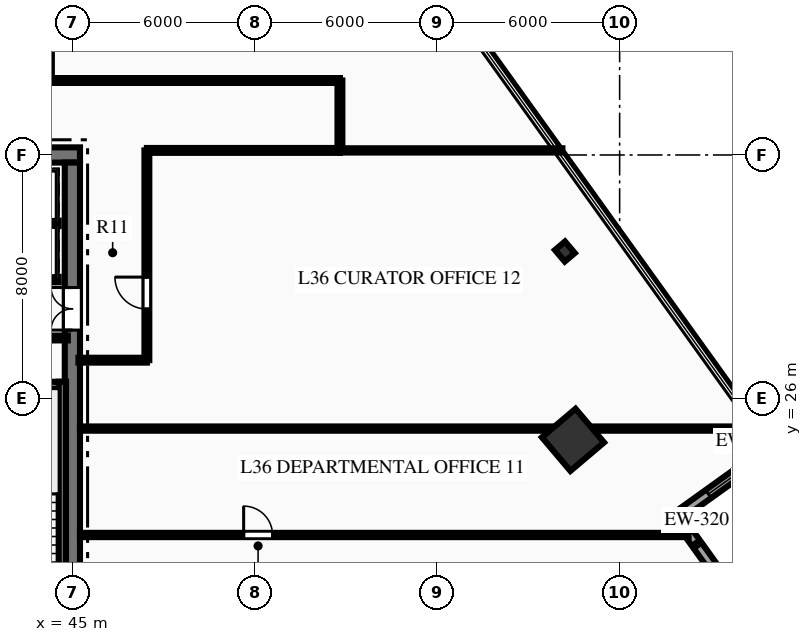
"""IFC4 building model, lengths in metres.
Left out: names, types, materials, properties, quantities, classifications, styles, units other than length and angle.
Written with IfcOpenShell. Run it as: python <this file> out.ifc"""

import sys

from ifc_helpers import new_model, si_unit, direction, frame, frame_2d, origin, origin_2d, place, context, subcontext, project, spatial, rectangle, hollow_rectangle, i_section, extrude, element, fill, save


model = new_model("IFC4")
c1 = context("Model", 3, precision=1e-05, world=origin(), true_north=direction((0.0, 1.0)))
c2 = subcontext(c1, "Body", "Model", "MODEL_VIEW")
j1 = project(units=[si_unit("LENGTHUNIT", "METRE"), si_unit("PLANEANGLEUNIT", "RADIAN")], contexts=[c1])
p1 = place(None, origin())
s1 = spatial("IfcSite", under=j1, at=p1, CompositionType="ELEMENT")
p2 = place(p1, origin())
s2 = spatial("IfcBuilding", under=s1, at=p2, CompositionType="ELEMENT")
p3 = place(p2, frame((0.0, 0.0, 148.2)))
s3 = spatial("IfcBuildingStorey", under=s2, at=p3, CompositionType="ELEMENT", Elevation=148.2)
p4 = place(p3, frame((26.75, 34.0, 0.0), z_axis=(0.0, 0.0, 1.0), x_axis=(1.0, 0.0, 0.0)))
e1 = element("IfcWall", 1, at=p4, inside=s3, PredefinedType="SHEAR", context=c2, shape_type="SweptSolid", body=[
    extrude(rectangle(XDim=18.5, YDim=0.5, at=frame_2d((9.25, 0.0))), origin(), (0.0, 0.0, 1.0), 3.75),
])
p5 = place(p4, frame((13.935, 0.0, 0.0)))
e2 = element("IfcOpeningElement", 2, at=p5, cuts=e1, PredefinedType="OPENING", context=c2, shape_type="SweptSolid", body=[
    extrude(rectangle(XDim=1.1, YDim=2.15, at=frame_2d((0.55, 1.075))), frame((0.0, 0.26, 0.0), z_axis=(0.0, -1.0, 0.0), x_axis=(1.0, 0.0, 0.0)), (0.0, 0.0, 1.0), 0.52),
])
p6 = place(p4, frame((16.185, 0.0, 0.0)))
e3 = element("IfcOpeningElement", 3, at=p6, cuts=e1, PredefinedType="OPENING", context=c2, shape_type="SweptSolid", body=[
    extrude(rectangle(XDim=1.1, YDim=2.15, at=frame_2d((0.55, 1.075))), frame((0.0, 0.26, 0.0), z_axis=(0.0, -1.0, 0.0), x_axis=(1.0, 0.0, 0.0)), (0.0, 0.0, 1.0), 0.52),
])
p7 = place(p3, frame((45.0, 18.25, 0.0), z_axis=(0.0, 0.0, 1.0), x_axis=(0.0, 1.0, 0.0)))
e4 = element("IfcWall", 4, at=p7, inside=s3, PredefinedType="SHEAR", context=c2, shape_type="SweptSolid", body=[
    extrude(rectangle(XDim=15.5, YDim=0.5, at=frame_2d((7.75, 0.0))), origin(), (0.0, 0.0, 1.0), 3.75),
])
p8 = place(p7, frame((9.99, 0.0, 0.0)))
e5 = element("IfcOpeningElement", 5, at=p8, cuts=e4, PredefinedType="OPENING", context=c2, shape_type="SweptSolid", body=[
    extrude(rectangle(XDim=1.4, YDim=2.2, at=frame_2d((0.7, 1.1))), frame((0.0, 0.26, 0.0), z_axis=(0.0, -1.0, 0.0), x_axis=(1.0, 0.0, 0.0)), (0.0, 0.0, 1.0), 0.52),
])
p9 = place(p3, frame((40.81, 26.42, 0.0), z_axis=(0.0, 0.0, 1.0), x_axis=(1.0, 0.0, 0.0)))
e6 = element("IfcWall", 6, at=p9, inside=s3, PredefinedType="SHEAR", context=c2, shape_type="SweptSolid", body=[
    extrude(rectangle(XDim=3.98, YDim=0.24, at=frame_2d((1.99, 0.0))), origin(), (0.0, 0.0, 1.0), 3.75),
])
p10 = place(p3, frame((44.67, 18.28, 0.0), z_axis=(0.0, 0.0, 1.0), x_axis=(0.0, 1.0, 0.0)))
e7 = element("IfcWall", 7, at=p10, inside=s3, PredefinedType="SHEAR", context=c2, shape_type="SweptSolid", body=[
    extrude(rectangle(XDim=8.26, YDim=0.24, at=frame_2d((4.13, 0.0))), origin(), (0.0, 0.0, 1.0), 3.75),
])
p11 = place(p3, frame((61.465, 24.629, 0.0), z_axis=(0.0, 0.0, 1.0), x_axis=(0.763232469783, 0.646123979643, 0.0)))
e8 = element("IfcColumn", 8, at=p11, inside=s3, PredefinedType="COLUMN", context=c2, shape_type="SweptSolid", body=[
    extrude(hollow_rectangle(XDim=1.45, YDim=1.45, WallThickness=0.07, at=origin_2d()), origin(), (0.0, 0.0, 1.0), 3.75),
])
p12 = place(p3, frame((61.199, 30.824, 0.0), z_axis=(0.0, 0.0, 1.0), x_axis=(0.763232469783, 0.646123979643, 0.0)))
e9 = element("IfcColumn", 9, at=p12, inside=s3, PredefinedType="COLUMN", context=c2, shape_type="SweptSolid", body=[
    extrude(i_section(OverallWidth=0.432, OverallDepth=0.498, WebThickness=0.056, FlangeThickness=0.089, at=origin_2d()), origin(), (0.0, 0.0, 1.0), 3.75),
])
p13 = place(p3, frame((64.884, 22.104, 0.0), z_axis=(0.0, 0.0, 1.0), x_axis=(0.582813264105, -0.812606115645, 0.0)))
e10 = element("IfcWall", 10, at=p13, inside=s3, PredefinedType="STANDARD", context=c2, shape_type="SweptSolid", body=[
    extrude(rectangle(XDim=4.0, YDim=0.32, at=frame_2d((2.0, 0.0))), origin(), (0.0, 0.0, 1.0), 3.46),
])
p14 = place(p3, frame((68.134, 24.436, 0.0), z_axis=(0.0, 0.0, 1.0), x_axis=(-0.812606115645, -0.582813264105, 0.0)))
e11 = element("IfcWall", 11, at=p14, inside=s3, PredefinedType="STANDARD", context=c2, shape_type="SweptSolid", body=[
    extrude(rectangle(XDim=4.0, YDim=0.32, at=frame_2d((2.0, 0.0))), origin(), (0.0, 0.0, 1.0), 3.46),
])
p15 = place(p14, frame((1.275, 0.0, 0.85)))
e12 = element("IfcOpeningElement", 12, at=p15, cuts=e11, PredefinedType="OPENING", context=c2, shape_type="SweptSolid", body=[
    extrude(rectangle(XDim=1.45, YDim=2.05, at=frame_2d((0.725, 1.025))), frame((0.0, 0.17, 0.0), z_axis=(0.0, -1.0, 0.0), x_axis=(1.0, 0.0, 0.0)), (0.0, 0.0, 1.0), 0.34),
])
p16 = place(p3, frame((40.8, 27.98, 0.0), z_axis=(0.0, 0.0, 1.0), x_axis=(1.0, 0.0, 0.0)))
e13 = element("IfcWall", 13, at=p16, inside=s3, PredefinedType="PARTITIONING", context=c2, shape_type="SweptSolid", body=[
    extrude(rectangle(XDim=4.05, YDim=0.16, at=frame_2d((2.025, 0.0))), origin(), (0.0, 0.0, 1.0), 3.46),
])
p17 = place(p16, frame((0.407, 0.0, 0.0)))
e14 = element("IfcOpeningElement", 14, at=p17, cuts=e13, PredefinedType="OPENING", context=c2, shape_type="SweptSolid", body=[
    extrude(rectangle(XDim=0.9, YDim=2.15, at=frame_2d((0.45, 1.075))), frame((0.0, 0.09, 0.0), z_axis=(0.0, -1.0, 0.0), x_axis=(1.0, 0.0, 0.0)), (0.0, 0.0, 1.0), 0.18),
])
p18 = place(p16, frame((2.2, 0.0, 0.0)))
e15 = element("IfcOpeningElement", 15, at=p18, cuts=e13, PredefinedType="OPENING", context=c2, shape_type="SweptSolid", body=[
    extrude(rectangle(XDim=0.9, YDim=2.15, at=frame_2d((0.45, 1.075))), frame((0.0, 0.09, 0.0), z_axis=(0.0, -1.0, 0.0), x_axis=(1.0, 0.0, 0.0)), (0.0, 0.0, 1.0), 0.18),
])
p19 = place(p3, frame((40.12, 29.9, 0.0), z_axis=(0.0, 0.0, 1.0), x_axis=(1.0, 0.0, 0.0)))
e16 = element("IfcWall", 16, at=p19, inside=s3, PredefinedType="PARTITIONING", context=c2, shape_type="SweptSolid", body=[
    extrude(rectangle(XDim=4.43, YDim=0.18, at=frame_2d((2.215, 0.0))), origin(), (0.0, 0.0, 1.0), 3.46),
])
p20 = place(p19, frame((0.565, 0.0, 0.0)))
e17 = element("IfcOpeningElement", 17, at=p20, cuts=e16, PredefinedType="OPENING", context=c2, shape_type="SweptSolid", body=[
    extrude(rectangle(XDim=1.1, YDim=2.15, at=frame_2d((0.55, 1.075))), frame((0.0, 0.1, 0.0), z_axis=(0.0, -1.0, 0.0), x_axis=(1.0, 0.0, 0.0)), (0.0, 0.0, 1.0), 0.2),
])
p21 = place(p19, frame((2.815, 0.0, 0.0)))
e18 = element("IfcOpeningElement", 18, at=p21, cuts=e16, PredefinedType="OPENING", context=c2, shape_type="SweptSolid", body=[
    extrude(rectangle(XDim=1.1, YDim=2.15, at=frame_2d((0.55, 1.075))), frame((0.0, 0.1, 0.0), z_axis=(0.0, -1.0, 0.0), x_axis=(1.0, 0.0, 0.0)), (0.0, 0.0, 1.0), 0.2),
])
p22 = place(p3, frame((40.12, 31.75, 0.0), z_axis=(0.0, 0.0, 1.0), x_axis=(1.0, 0.0, 0.0)))
e19 = element("IfcWall", 19, at=p22, inside=s3, PredefinedType="PARTITIONING", context=c2, shape_type="SweptSolid", body=[
    extrude(rectangle(XDim=4.43, YDim=0.18, at=frame_2d((2.215, 0.0))), origin(), (0.0, 0.0, 1.0), 3.46),
])
p23 = place(p3, frame((18.2, 36.45, 0.0), z_axis=(0.0, 0.0, 1.0), x_axis=(1.0, 0.0, 0.0)))
e20 = element("IfcWall", 20, at=p23, inside=s3, PredefinedType="PARTITIONING", context=c2, shape_type="SweptSolid", body=[
    extrude(rectangle(XDim=35.6, YDim=0.16, at=frame_2d((17.8, 0.0))), origin(), (0.0, 0.0, 1.0), 3.46),
])
p24 = place(p23, frame((7.55, 0.0, 0.0)))
e21 = element("IfcOpeningElement", 21, at=p24, cuts=e20, PredefinedType="OPENING", context=c2, shape_type="SweptSolid", body=[
    extrude(rectangle(XDim=0.9, YDim=2.15, at=frame_2d((0.45, 1.075))), frame((0.0, 0.09, 0.0), z_axis=(0.0, -1.0, 0.0), x_axis=(1.0, 0.0, 0.0)), (0.0, 0.0, 1.0), 0.18),
])
p25 = place(p23, frame((9.85, 0.0, 0.0)))
e22 = element("IfcOpeningElement", 22, at=p25, cuts=e20, PredefinedType="OPENING", context=c2, shape_type="SweptSolid", body=[
    extrude(rectangle(XDim=0.9, YDim=2.15, at=frame_2d((0.45, 1.075))), frame((0.0, 0.09, 0.0), z_axis=(0.0, -1.0, 0.0), x_axis=(1.0, 0.0, 0.0)), (0.0, 0.0, 1.0), 0.18),
])
p26 = place(p23, frame((12.1, 0.0, 0.0)))
e23 = element("IfcOpeningElement", 23, at=p26, cuts=e20, PredefinedType="OPENING", context=c2, shape_type="SweptSolid", body=[
    extrude(rectangle(XDim=1.0, YDim=2.15, at=frame_2d((0.5, 1.075))), frame((0.0, 0.09, 0.0), z_axis=(0.0, -1.0, 0.0), x_axis=(1.0, 0.0, 0.0)), (0.0, 0.0, 1.0), 0.18),
])
p27 = place(p23, frame((18.485, 0.0, 0.0)))
e24 = element("IfcOpeningElement", 24, at=p27, cuts=e20, PredefinedType="OPENING", context=c2, shape_type="SweptSolid", body=[
    extrude(rectangle(XDim=1.05, YDim=2.15, at=frame_2d((0.525, 1.075))), frame((0.0, 0.09, 0.0), z_axis=(0.0, -1.0, 0.0), x_axis=(1.0, 0.0, 0.0)), (0.0, 0.0, 1.0), 0.18),
])
p28 = place(p23, frame((25.125, 0.0, 0.0)))
e25 = element("IfcOpeningElement", 25, at=p28, cuts=e20, PredefinedType="OPENING", context=c2, shape_type="SweptSolid", body=[
    extrude(rectangle(XDim=1.05, YDim=2.15, at=frame_2d((0.525, 1.075))), frame((0.0, 0.09, 0.0), z_axis=(0.0, -1.0, 0.0), x_axis=(1.0, 0.0, 0.0)), (0.0, 0.0, 1.0), 0.18),
])
p29 = place(p3, frame((47.45, 34.15, 0.0), z_axis=(0.0, 0.0, 1.0), x_axis=(1.0, 0.0, 0.0)))
e26 = element("IfcWall", 26, at=p29, inside=s3, PredefinedType="PARTITIONING", context=c2, shape_type="SweptSolid", body=[
    extrude(rectangle(XDim=6.35, YDim=0.16, at=frame_2d((3.175, 0.0))), origin(), (0.0, 0.0, 1.0), 3.46),
])
p30 = place(p3, frame((47.45, 27.25, 0.0), z_axis=(0.0, 0.0, 1.0), x_axis=(0.0, 1.0, 0.0)))
e27 = element("IfcWall", 27, at=p30, inside=s3, PredefinedType="PARTITIONING", context=c2, shape_type="SweptSolid", body=[
    extrude(rectangle(XDim=6.9, YDim=0.16, at=frame_2d((3.45, 0.0))), origin(), (0.0, 0.0, 1.0), 3.46),
])
p31 = place(p30, frame((1.683, 0.0, 0.0)))
e28 = element("IfcOpeningElement", 28, at=p31, cuts=e27, PredefinedType="OPENING", context=c2, shape_type="SweptSolid", body=[
    extrude(rectangle(XDim=1.05, YDim=2.15, at=frame_2d((0.525, 1.075))), frame((0.0, 0.09, 0.0), z_axis=(0.0, -1.0, 0.0), x_axis=(1.0, 0.0, 0.0)), (0.0, 0.0, 1.0), 0.18),
])
p32 = place(p3, frame((45.2, 27.25, 0.0), z_axis=(0.0, 0.0, 1.0), x_axis=(1.0, 0.0, 0.0)))
e29 = element("IfcWall", 29, at=p32, inside=s3, PredefinedType="PARTITIONING", context=c2, shape_type="SweptSolid", body=[
    extrude(rectangle(XDim=2.25, YDim=0.16, at=frame_2d((1.125, 0.0))), origin(), (0.0, 0.0, 1.0), 3.46),
])
p33 = place(p3, frame((53.8, 34.15, 0.0), z_axis=(0.0, 0.0, 1.0), x_axis=(0.0, 1.0, 0.0)))
e30 = element("IfcWall", 30, at=p33, inside=s3, PredefinedType="PARTITIONING", context=c2, shape_type="SweptSolid", body=[
    extrude(rectangle(XDim=2.3, YDim=0.16, at=frame_2d((1.15, 0.0))), origin(), (0.0, 0.0, 1.0), 3.46),
])
p34 = place(p3, frame((53.8, 34.15, 0.0), z_axis=(0.0, 0.0, 1.0), x_axis=(1.0, 0.0, 0.0)))
e31 = element("IfcWall", 31, at=p34, inside=s3, PredefinedType="PARTITIONING", context=c2, shape_type="SweptSolid", body=[
    extrude(rectangle(XDim=7.317, YDim=0.14, at=frame_2d((3.659, 0.0))), origin(), (0.0, 0.0, 1.0), 3.46),
])
p35 = place(p3, frame((45.25, 21.5, 0.0), z_axis=(0.0, 0.0, 1.0), x_axis=(1.0, 0.0, 0.0)))
e32 = element("IfcWall", 32, at=p35, inside=s3, PredefinedType="PARTITIONING", context=c2, shape_type="SweptSolid", body=[
    extrude(rectangle(XDim=20.018, YDim=0.14, at=frame_2d((10.009, 0.0))), origin(), (0.0, 0.0, 1.0), 3.46),
])
p36 = place(p35, frame((5.383, 0.0, 0.0)))
e33 = element("IfcOpeningElement", 33, at=p36, cuts=e32, PredefinedType="OPENING", context=c2, shape_type="SweptSolid", body=[
    extrude(rectangle(XDim=0.95, YDim=2.15, at=frame_2d((0.475, 1.075))), frame((0.0, 0.08, 0.0), z_axis=(0.0, -1.0, 0.0), x_axis=(1.0, 0.0, 0.0)), (0.0, 0.0, 1.0), 0.16),
])
p37 = place(p3, frame((45.25, 25.0, 0.0), z_axis=(0.0, 0.0, 1.0), x_axis=(1.0, 0.0, 0.0)))
e34 = element("IfcWall", 34, at=p37, inside=s3, PredefinedType="PARTITIONING", context=c2, shape_type="SweptSolid", body=[
    extrude(rectangle(XDim=22.43, YDim=0.14, at=frame_2d((11.215, 0.0))), origin(), (0.0, 0.0, 1.0), 2.839),
])
p38 = place(p15, origin())
e35 = element("IfcWindow", 35, at=p38, inside=s3, PartitioningType="SINGLE_PANEL", PredefinedType="WINDOW", context=c2, shape_type="SweptSolid", body=[
    extrude(rectangle(XDim=1.45, YDim=2.05, at=frame_2d((0.725, 1.025))), frame((0.0, 0.03, 0.0), z_axis=(0.0, -1.0, 0.0), x_axis=(1.0, 0.0, 0.0)), (0.0, 0.0, 1.0), 0.06),
])
fill(e12, e35)
p39 = place(p8, origin())
e36 = element("IfcDoor", 36, at=p39, inside=s3, OperationType="DOUBLE_DOOR_SINGLE_SWING", PredefinedType="DOOR", context=c2, shape_type="SweptSolid", body=[
    extrude(rectangle(XDim=1.4, YDim=2.2, at=frame_2d((0.7, 1.1))), frame((0.0, 0.025, 0.0), z_axis=(0.0, -1.0, 0.0), x_axis=(1.0, 0.0, 0.0)), (0.0, 0.0, 1.0), 0.05),
])
fill(e5, e36)
p40 = place(p28, origin())
e37 = element("IfcDoor", 37, at=p40, inside=s3, OperationType="SINGLE_SWING_RIGHT", PredefinedType="DOOR", context=c2, shape_type="SweptSolid", body=[
    extrude(rectangle(XDim=1.05, YDim=2.15, at=frame_2d((0.525, 1.075))), frame((0.0, 0.025, 0.0), z_axis=(0.0, -1.0, 0.0), x_axis=(1.0, 0.0, 0.0)), (0.0, 0.0, 1.0), 0.05),
])
fill(e25, e37)
p41 = place(p36, origin())
e38 = element("IfcDoor", 38, at=p41, inside=s3, OperationType="SINGLE_SWING_LEFT", PredefinedType="DOOR", context=c2, shape_type="SweptSolid", body=[
    extrude(rectangle(XDim=0.95, YDim=2.15, at=frame_2d((0.475, 1.075))), frame((0.0, 0.025, 0.0), z_axis=(0.0, -1.0, 0.0), x_axis=(1.0, 0.0, 0.0)), (0.0, 0.0, 1.0), 0.05),
])
fill(e33, e38)
p42 = place(p31, origin())
e39 = element("IfcDoor", 39, at=p42, inside=s3, OperationType="SINGLE_SWING_RIGHT", PredefinedType="DOOR", context=c2, shape_type="SweptSolid", body=[
    extrude(rectangle(XDim=1.05, YDim=2.15, at=frame_2d((0.525, 1.075))), frame((0.0, 0.025, 0.0), z_axis=(0.0, -1.0, 0.0), x_axis=(1.0, 0.0, 0.0)), (0.0, 0.0, 1.0), 0.05),
])
fill(e28, e39)
save(model, sys.argv[1])
